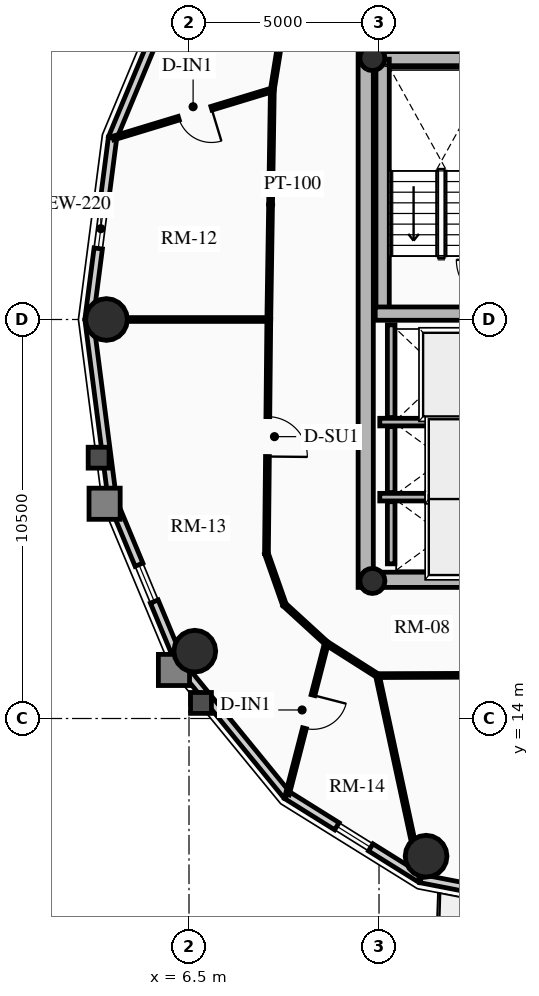
"""IFC4 building model, lengths in metres.
Left out: names, types, materials, properties, quantities, classifications, styles, units other than length and angle.
Written with IfcOpenShell. Run it as: python <this file> out.ifc"""

import sys

from ifc_helpers import new_model, si_unit, direction, frame, frame_2d, origin, origin_2d, place, context, subcontext, project, spatial, rectangle, circle, hollow_circle, extrude, source, transform, mapped, element, fill, save


model = new_model("IFC4")
c1 = context("Model", 3, precision=1e-05, world=origin(), true_north=direction((0.0, 1.0)))
c2 = subcontext(c1, "Body", "Model", "MODEL_VIEW")
j1 = project(units=[si_unit("LENGTHUNIT", "METRE"), si_unit("PLANEANGLEUNIT", "RADIAN")], contexts=[c1])
p1 = place(None, origin())
s1 = spatial("IfcSite", under=j1, at=p1, CompositionType="ELEMENT")
p2 = place(p1, origin())
s2 = spatial("IfcBuilding", under=s1, at=p2, CompositionType="ELEMENT")
p3 = place(p2, frame((0.0, 0.0, 232.45)))
s3 = spatial("IfcBuildingStorey", under=s2, at=p3, CompositionType="ELEMENT", Elevation=232.45)
p4 = place(p3, frame((11.15, 17.45, 0.0), z_axis=(0.0, 0.0, 1.0), x_axis=(0.0, 1.0, 0.0)))
e1 = element("IfcWall", 1, at=p4, inside=s3, PredefinedType="SHEAR", context=c2, shape_type="SweptSolid", body=[
    extrude(rectangle(XDim=14.1, YDim=0.4, at=frame_2d((7.05, 0.0))), origin(), (0.0, 0.0, 1.0), 3.2),
])
p5 = place(p3, frame((11.15, 17.65, 0.0), z_axis=(0.0, 0.0, 1.0), x_axis=(1.0, 0.0, 0.0)))
e2 = element("IfcWall", 2, at=p5, inside=s3, PredefinedType="SHEAR", context=c2, shape_type="SweptSolid", body=[
    extrude(rectangle(XDim=10.7, YDim=0.4, at=frame_2d((5.35, 0.0))), origin(), (0.0, 0.0, 1.0), 3.2),
])
m1 = source(origin(), c2, "Body", "SweptSolid", [
    extrude(rectangle(XDim=1.5, YDim=2.02, at=frame_2d((0.75, 1.01))), frame((0.0, 0.21, 0.0), z_axis=(0.0, -1.0, 0.0), x_axis=(1.0, 0.0, 0.0)), (0.0, 0.0, 1.0), 0.42),
])
p6 = place(p5, frame((5.45, 0.0, 0.0)))
e3 = element("IfcOpeningElement", 3, at=p6, cuts=e2, PredefinedType="OPENING", context=c2, shape_type="MappedRepresentation", body=[
    mapped(m1, transform((0.0, 0.0, 0.0), x_axis=(1.0, 0.0, 0.0), y_axis=(0.0, 1.0, 0.0), z_axis=(0.0, 0.0, 1.0), scale=1.0)),
])
p7 = place(p3, frame((11.15, 31.35, 0.0), z_axis=(0.0, 0.0, 1.0), x_axis=(1.0, 0.0, 0.0)))
e4 = element("IfcWall", 4, at=p7, inside=s3, PredefinedType="SHEAR", context=c2, shape_type="SweptSolid", body=[
    extrude(rectangle(XDim=10.7, YDim=0.4, at=frame_2d((5.35, 0.0))), origin(), (0.0, 0.0, 1.0), 3.2),
])
p8 = place(p7, frame((4.6, 0.0, 0.0)))
e5 = element("IfcOpeningElement", 5, at=p8, cuts=e4, PredefinedType="OPENING", context=c2, shape_type="MappedRepresentation", body=[
    mapped(m1, transform((0.0, 0.0, 0.0), x_axis=(1.0, 0.0, 0.0), y_axis=(0.0, 1.0, 0.0), z_axis=(0.0, 0.0, 1.0), scale=1.0)),
])
p9 = place(p3, frame((11.595, 24.655, 0.0), z_axis=(0.0, 0.0, 1.0), x_axis=(0.0, 1.0, 0.0)))
e6 = element("IfcWall", 6, at=p9, inside=s3, PredefinedType="SHEAR", context=c2, shape_type="SweptSolid", body=[
    extrude(rectangle(XDim=6.695, YDim=0.35, at=frame_2d((3.348, 0.0))), origin(), (0.0, 0.0, 1.0), 3.2),
])
p10 = place(p3, frame((11.4, 24.655, 0.0), z_axis=(0.0, 0.0, 1.0), x_axis=(1.0, 0.0, 0.0)))
e7 = element("IfcWall", 7, at=p10, inside=s3, PredefinedType="SHEAR", context=c2, shape_type="SweptSolid", body=[
    extrude(rectangle(XDim=3.285, YDim=0.35, at=frame_2d((1.643, 0.0))), origin(), (0.0, 0.0, 1.0), 3.2),
])
for number, where, z_axis, x_axis in (
    (8, (11.325, 17.62, 0.0), (0.0, 0.0, 1.0), (1.0, 0.0, 0.0)),
    (9, (11.325, 31.38, 0.0), (0.0, 0.0, 1.0), (1.0, 0.0, 0.0)),
):
    element("IfcColumn", number, at=place(p3, frame(where, z_axis=z_axis, x_axis=x_axis)), inside=s3, PredefinedType="COLUMN", context=c2, shape_type="SweptSolid", body=[
        extrude(hollow_circle(Radius=0.33, WallThickness=0.025, at=origin_2d()), origin(), (0.0, 0.0, 1.0), 3.2),
    ])
for number, where, z_axis, x_axis in (
    (10, (4.328, 24.5, 0.0), (0.0, 0.0, 1.0), (1.0, 0.0, 0.0)),
    (11, (6.653, 15.771, 0.0), (0.0, 0.0, 1.0), (1.0, 0.0, 0.0)),
    (12, (12.739, 10.377, 0.0), (0.0, 0.0, 1.0), (1.0, 0.0, 0.0)),
):
    element("IfcColumn", number, at=place(p3, frame(where, z_axis=z_axis, x_axis=x_axis)), inside=s3, PredefinedType="USERDEFINED", context=c2, shape_type="SweptSolid", body=[
        extrude(circle(Radius=0.55, at=origin_2d()), origin(), (0.0, 0.0, 1.0), 3.2),
    ])
p11 = place(p3, frame((4.488, 29.281, 0.0), z_axis=(0.0, 0.0, 1.0), x_axis=(0.384036305194, 0.923317993052, 0.0)))
e13 = element("IfcWall", 13, at=p11, inside=s3, PredefinedType="SOLIDWALL", context=c2, shape_type="SweptSolid", body=[
    extrude(rectangle(XDim=4.671, YDim=0.22, at=frame_2d((2.335, 0.0))), origin(), (0.0, 0.0, 1.0), 2.402),
])
p12 = place(p3, frame((3.87, 24.5, 0.0), z_axis=(0.0, 0.0, 1.0), x_axis=(0.128241318541, 0.991742993027, 0.0)))
e14 = element("IfcWall", 14, at=p12, inside=s3, PredefinedType="SOLIDWALL", context=c2, shape_type="SweptSolid", body=[
    extrude(rectangle(XDim=4.82, YDim=0.22, at=frame_2d((2.41, 0.0))), origin(), (0.0, 0.0, 1.0), 2.402),
])
m2 = source(origin(), c2, "Body", "SweptSolid", [
    extrude(rectangle(XDim=1.05, YDim=1.3, at=frame_2d((0.525, 0.65))), frame((0.0, 0.12, 0.0), z_axis=(0.0, -1.0, 0.0), x_axis=(1.0, 0.0, 0.0)), (0.0, 0.0, 1.0), 0.24),
])
p13 = place(p12, frame((1.885, 0.0, 0.65)))
e15 = element("IfcOpeningElement", 15, at=p13, cuts=e14, PredefinedType="OPENING", context=c2, shape_type="MappedRepresentation", body=[
    mapped(m2, transform((0.0, 0.0, 0.0), x_axis=(1.0, 0.0, 0.0), y_axis=(0.0, 1.0, 0.0), z_axis=(0.0, 0.0, 1.0), scale=1.0)),
])
p14 = place(p3, frame((4.488, 19.719, 0.0), z_axis=(0.0, 0.0, 1.0), x_axis=(-0.128241318541, 0.991742993027, 0.0)))
e16 = element("IfcWall", 16, at=p14, inside=s3, PredefinedType="SOLIDWALL", context=c2, shape_type="SweptSolid", body=[
    extrude(rectangle(XDim=4.82, YDim=0.22, at=frame_2d((2.41, 0.0))), origin(), (0.0, 0.0, 1.0), 2.402),
])
p15 = place(p3, frame((6.282, 15.407, 0.0), z_axis=(0.0, 0.0, 1.0), x_axis=(-0.384036305194, 0.923317993052, 0.0)))
e17 = element("IfcWall", 17, at=p15, inside=s3, PredefinedType="SOLIDWALL", context=c2, shape_type="SweptSolid", body=[
    extrude(rectangle(XDim=4.671, YDim=0.22, at=frame_2d((2.335, 0.0))), origin(), (0.0, 0.0, 1.0), 2.402),
])
p16 = place(p15, frame((1.81, 0.0, 0.65)))
e18 = element("IfcOpeningElement", 18, at=p16, cuts=e17, PredefinedType="OPENING", context=c2, shape_type="MappedRepresentation", body=[
    mapped(m2, transform((0.0, 0.0, 0.0), x_axis=(1.0, 0.0, 0.0), y_axis=(0.0, 1.0, 0.0), z_axis=(0.0, 0.0, 1.0), scale=1.0)),
])
p17 = place(p3, frame((9.076, 11.985, 0.0), z_axis=(0.0, 0.0, 1.0), x_axis=(-0.632467166636, 0.774587169483, 0.0)))
e19 = element("IfcWall", 19, at=p17, inside=s3, PredefinedType="SOLIDWALL", context=c2, shape_type="SweptSolid", body=[
    extrude(rectangle(XDim=4.418, YDim=0.22, at=frame_2d((2.209, 0.0))), origin(), (0.0, 0.0, 1.0), 2.402),
])
p18 = place(p3, frame((12.597, 9.787, 0.0), z_axis=(0.0, 0.0, 1.0), x_axis=(-0.848318713376, 0.529485939886, 0.0)))
e20 = element("IfcWall", 20, at=p18, inside=s3, PredefinedType="SOLIDWALL", context=c2, shape_type="SweptSolid", body=[
    extrude(rectangle(XDim=4.15, YDim=0.22, at=frame_2d((2.075, 0.0))), origin(), (0.0, 0.0, 1.0), 2.402),
])
p19 = place(p18, frame((1.55, 0.0, 0.65)))
e21 = element("IfcOpeningElement", 21, at=p19, cuts=e20, PredefinedType="OPENING", context=c2, shape_type="MappedRepresentation", body=[
    mapped(m2, transform((0.0, 0.0, 0.0), x_axis=(1.0, 0.0, 0.0), y_axis=(0.0, 1.0, 0.0), z_axis=(0.0, 0.0, 1.0), scale=1.0)),
])
p20 = place(p3, frame((16.5, 9.03, 0.0), z_axis=(0.0, 0.0, 1.0), x_axis=(-0.981700307484, 0.190432419211, 0.0)))
e22 = element("IfcWall", 22, at=p20, inside=s3, PredefinedType="SOLIDWALL", context=c2, shape_type="SweptSolid", body=[
    extrude(rectangle(XDim=3.976, YDim=0.22, at=frame_2d((1.988, 0.0))), origin(), (0.0, 0.0, 1.0), 2.402),
])
m3 = source(origin(), c2, "Body", "SweptSolid", [
    extrude(rectangle(XDim=1.15, YDim=2.005, at=frame_2d((0.575, 1.002))), frame((0.0, 0.12, 0.0), z_axis=(0.0, -1.0, 0.0), x_axis=(1.0, 0.0, 0.0)), (0.0, 0.0, 1.0), 0.24),
])
p21 = place(p20, frame((1.413, 0.0, 0.0)))
e23 = element("IfcOpeningElement", 23, at=p21, cuts=e22, PredefinedType="OPENING", context=c2, shape_type="MappedRepresentation", body=[
    mapped(m3, transform((0.0, 0.0, 0.0), x_axis=(1.0, 0.0, 0.0), y_axis=(0.0, 1.0, 0.0), z_axis=(0.0, 0.0, 1.0), scale=1.0)),
])
p22 = place(p3, frame((11.52, 21.8, 0.0), z_axis=(0.0, 0.0, 1.0), x_axis=(1.0, 0.0, 0.0)))
e24 = element("IfcWall", 24, at=p22, inside=s3, PredefinedType="SHEAR", context=c2, shape_type="SweptSolid", body=[
    extrude(rectangle(XDim=2.97, YDim=0.2, at=frame_2d((1.485, 0.0))), origin(), (0.0, 0.0, 1.0), 3.2),
])
p23 = place(p3, frame((11.82, 21.92, 0.0), z_axis=(0.0, 0.0, 1.0), x_axis=(0.0, 1.0, 0.0)))
e25 = element("IfcWall", 25, at=p23, inside=s3, PredefinedType="SHEAR", context=c2, shape_type="SweptSolid", body=[
    extrude(rectangle(XDim=2.44, YDim=0.2, at=frame_2d((1.22, 0.0))), origin(), (0.0, 0.0, 1.0), 3.2),
])
p24 = place(p3, frame((11.52, 19.825, 0.0), z_axis=(0.0, 0.0, 1.0), x_axis=(1.0, 0.0, 0.0)))
e26 = element("IfcWall", 26, at=p24, inside=s3, PredefinedType="SHEAR", context=c2, shape_type="SweptSolid", body=[
    extrude(rectangle(XDim=2.97, YDim=0.2, at=frame_2d((1.485, 0.0))), origin(), (0.0, 0.0, 1.0), 3.2),
])
p25 = place(p3, frame((11.82, 19.945, 0.0), z_axis=(0.0, 0.0, 1.0), x_axis=(0.0, 1.0, 0.0)))
e27 = element("IfcWall", 27, at=p25, inside=s3, PredefinedType="SHEAR", context=c2, shape_type="SweptSolid", body=[
    extrude(rectangle(XDim=1.735, YDim=0.2, at=frame_2d((0.867, 0.0))), origin(), (0.0, 0.0, 1.0), 3.2),
])
p26 = place(p3, frame((11.82, 18.07, 0.0), z_axis=(0.0, 0.0, 1.0), x_axis=(0.0, 1.0, 0.0)))
e28 = element("IfcWall", 28, at=p26, inside=s3, PredefinedType="SHEAR", context=c2, shape_type="SweptSolid", body=[
    extrude(rectangle(XDim=1.635, YDim=0.2, at=frame_2d((0.817, 0.0))), origin(), (0.0, 0.0, 1.0), 3.2),
])
p27 = place(p3, frame((8.94, 32.078, 0.0), z_axis=(0.0, 0.0, 1.0), x_axis=(-0.159148467753, -0.98725466077, 0.0)))
e29 = element("IfcWall", 29, at=p27, inside=s3, PredefinedType="MOVABLE", context=c2, shape_type="SweptSolid", body=[
    extrude(rectangle(XDim=1.554, YDim=0.1, at=frame_2d((0.777, 0.0))), origin(), (0.0, 0.0, 1.0), 2.335),
])
p28 = place(p3, frame((8.693, 30.544, 0.0), z_axis=(0.0, 0.0, 1.0), x_axis=(-0.015307007986, -0.99988284089, 0.0)))
e30 = element("IfcWall", 30, at=p28, inside=s3, PredefinedType="MOVABLE", context=c2, shape_type="SweptSolid", body=[
    extrude(rectangle(XDim=6.045, YDim=0.1, at=frame_2d((3.022, 0.0))), origin(), (0.0, 0.0, 1.0), 2.335),
])
p29 = place(p3, frame((8.6, 24.5, 0.0), z_axis=(0.0, 0.0, 1.0), x_axis=(-0.010023665349, -0.999949761805, 0.0)))
e31 = element("IfcWall", 31, at=p29, inside=s3, PredefinedType="MOVABLE", context=c2, shape_type="SweptSolid", body=[
    extrude(rectangle(XDim=6.162, YDim=0.1, at=frame_2d((3.081, 0.0))), origin(), (0.0, 0.0, 1.0), 2.335),
])
m4 = source(origin(), c2, "Body", "SweptSolid", [
    extrude(rectangle(XDim=1.05, YDim=2.015, at=frame_2d((0.525, 1.007))), frame((0.0, 0.06, 0.0), z_axis=(0.0, -1.0, 0.0), x_axis=(1.0, 0.0, 0.0)), (0.0, 0.0, 1.0), 0.12),
])
p30 = place(p29, frame((2.556, 0.0, 0.0)))
e32 = element("IfcOpeningElement", 32, at=p30, cuts=e31, PredefinedType="OPENING", context=c2, shape_type="MappedRepresentation", body=[
    mapped(m4, transform((0.0, 0.0, 0.0), x_axis=(1.0, 0.0, 0.0), y_axis=(0.0, 1.0, 0.0), z_axis=(0.0, 0.0, 1.0), scale=1.0)),
])
p31 = place(p3, frame((8.538, 18.338, 0.0), z_axis=(0.0, 0.0, 1.0), x_axis=(0.331358150167, -0.94350504838, 0.0)))
e33 = element("IfcWall", 33, at=p31, inside=s3, PredefinedType="MOVABLE", context=c2, shape_type="SweptSolid", body=[
    extrude(rectangle(XDim=1.424, YDim=0.1, at=frame_2d((0.712, 0.0))), origin(), (0.0, 0.0, 1.0), 2.335),
])
p32 = place(p3, frame((9.01, 16.994, 0.0), z_axis=(0.0, 0.0, 1.0), x_axis=(0.737701798986, -0.67512669609, 0.0)))
e34 = element("IfcWall", 34, at=p32, inside=s3, PredefinedType="MOVABLE", context=c2, shape_type="SweptSolid", body=[
    extrude(rectangle(XDim=1.498, YDim=0.1, at=frame_2d((0.749, 0.0))), origin(), (0.0, 0.0, 1.0), 2.402),
])
p33 = place(p3, frame((10.115, 15.983, 0.0), z_axis=(0.0, 0.0, 1.0), x_axis=(0.843995849351, -0.536349705209, 0.0)))
e35 = element("IfcWall", 35, at=p33, inside=s3, PredefinedType="MOVABLE", context=c2, shape_type="SweptSolid", body=[
    extrude(rectangle(XDim=1.593, YDim=0.1, at=frame_2d((0.796, 0.0))), origin(), (0.0, 0.0, 1.0), 2.335),
])
p34 = place(p3, frame((11.46, 15.129, 0.0), z_axis=(0.0, 0.0, 1.0), x_axis=(0.999993513287, 0.003601858435, 0.0)))
e36 = element("IfcWall", 36, at=p34, inside=s3, PredefinedType="MOVABLE", context=c2, shape_type="SweptSolid", body=[
    extrude(rectangle(XDim=3.321, YDim=0.1, at=frame_2d((1.661, 0.0))), origin(), (0.0, 0.0, 1.0), 2.402),
])
p35 = place(p3, frame((8.6, 24.5, 0.0), z_axis=(0.0, 0.0, 1.0), x_axis=(-1.0, 0.0, 0.0)))
e37 = element("IfcWall", 37, at=p35, inside=s3, PredefinedType="MOVABLE", context=c2, shape_type="SweptSolid", body=[
    extrude(rectangle(XDim=4.71, YDim=0.1, at=frame_2d((2.355, 0.0))), origin(), (0.0, 0.0, 1.0), 2.402),
])
p36 = place(p3, frame((11.46, 15.129, 0.0), z_axis=(0.0, 0.0, 1.0), x_axis=(0.210058897642, -0.977688733453, 0.0)))
e38 = element("IfcWall", 38, at=p36, inside=s3, PredefinedType="MOVABLE", context=c2, shape_type="SweptSolid", body=[
    extrude(rectangle(XDim=5.444, YDim=0.1, at=frame_2d((2.722, 0.0))), origin(), (0.0, 0.0, 1.0), 2.402),
])
p37 = place(p3, frame((8.693, 30.544, 0.0), z_axis=(0.0, 0.0, 1.0), x_axis=(-0.956933754187, -0.290306372814, 0.0)))
e39 = element("IfcWall", 39, at=p37, inside=s3, PredefinedType="MOVABLE", context=c2, shape_type="SweptSolid", body=[
    extrude(rectangle(XDim=4.374, YDim=0.1, at=frame_2d((2.187, 0.0))), origin(), (0.0, 0.0, 1.0), 2.335),
])
m5 = source(origin(), c2, "Body", "SweptSolid", [
    extrude(rectangle(XDim=0.9, YDim=2.005, at=frame_2d((0.45, 1.002))), frame((0.0, 0.06, 0.0), z_axis=(0.0, -1.0, 0.0), x_axis=(1.0, 0.0, 0.0)), (0.0, 0.0, 1.0), 0.12),
])
p38 = place(p37, frame((1.674, 0.0, 0.0)))
e40 = element("IfcOpeningElement", 40, at=p38, cuts=e39, PredefinedType="OPENING", context=c2, shape_type="MappedRepresentation", body=[
    mapped(m5, transform((0.0, 0.0, 0.0), x_axis=(1.0, 0.0, 0.0), y_axis=(0.0, 1.0, 0.0), z_axis=(0.0, 0.0, 1.0), scale=1.0)),
])
p39 = place(p3, frame((10.115, 15.983, 0.0), z_axis=(0.0, 0.0, 1.0), x_axis=(-0.249861860474, -0.968281493513, 0.0)))
e41 = element("IfcWall", 41, at=p39, inside=s3, PredefinedType="MOVABLE", context=c2, shape_type="SweptSolid", body=[
    extrude(rectangle(XDim=4.113, YDim=0.1, at=frame_2d((2.056, 0.0))), origin(), (0.0, 0.0, 1.0), 2.335),
])
p40 = place(p39, frame((1.413, 0.0, 0.0)))
e42 = element("IfcOpeningElement", 42, at=p40, cuts=e41, PredefinedType="OPENING", context=c2, shape_type="MappedRepresentation", body=[
    mapped(m5, transform((0.0, 0.0, 0.0), x_axis=(1.0, 0.0, 0.0), y_axis=(0.0, 1.0, 0.0), z_axis=(0.0, 0.0, 1.0), scale=1.0)),
])
m6 = source(origin(), c2, "Body", "SweptSolid", [
    extrude(rectangle(XDim=1.05, YDim=1.3, at=frame_2d((0.525, 0.65))), frame((0.0, 0.03, 0.0), z_axis=(0.0, -1.0, 0.0), x_axis=(1.0, 0.0, 0.0)), (0.0, 0.0, 1.0), 0.06),
])
p41 = place(p13, origin())
e43 = element("IfcWindow", 43, at=p41, inside=s3, PartitioningType="SINGLE_PANEL", PredefinedType="WINDOW", context=c2, shape_type="MappedRepresentation", body=[
    mapped(m6, transform((0.0, 0.0, 0.0), x_axis=(1.0, 0.0, 0.0), y_axis=(0.0, 1.0, 0.0), z_axis=(0.0, 0.0, 1.0), scale=1.0)),
])
fill(e15, e43)
p42 = place(p16, origin())
e44 = element("IfcWindow", 44, at=p42, inside=s3, PartitioningType="SINGLE_PANEL", PredefinedType="WINDOW", context=c2, shape_type="MappedRepresentation", body=[
    mapped(m6, transform((0.0, 0.0, 0.0), x_axis=(1.0, 0.0, 0.0), y_axis=(0.0, 1.0, 0.0), z_axis=(0.0, 0.0, 1.0), scale=1.0)),
])
fill(e18, e44)
p43 = place(p19, origin())
e45 = element("IfcWindow", 45, at=p43, inside=s3, PartitioningType="SINGLE_PANEL", PredefinedType="WINDOW", context=c2, shape_type="MappedRepresentation", body=[
    mapped(m6, transform((0.0, 0.0, 0.0), x_axis=(1.0, 0.0, 0.0), y_axis=(0.0, 1.0, 0.0), z_axis=(0.0, 0.0, 1.0), scale=1.0)),
])
fill(e21, e45)
m7 = source(origin(), c2, "Body", "SweptSolid", [
    extrude(rectangle(XDim=0.9, YDim=2.005, at=frame_2d((0.45, 1.002))), frame((0.0, 0.025, 0.0), z_axis=(0.0, -1.0, 0.0), x_axis=(1.0, 0.0, 0.0)), (0.0, 0.0, 1.0), 0.05),
])
p44 = place(p38, origin())
e46 = element("IfcDoor", 46, at=p44, inside=s3, OperationType="SINGLE_SWING_LEFT", PredefinedType="DOOR", context=c2, shape_type="MappedRepresentation", body=[
    mapped(m7, transform((0.0, 0.0, 0.0), x_axis=(1.0, 0.0, 0.0), y_axis=(0.0, 1.0, 0.0), z_axis=(0.0, 0.0, 1.0), scale=1.0)),
])
fill(e40, e46)
m8 = source(origin(), c2, "Body", "SweptSolid", [
    extrude(rectangle(XDim=1.05, YDim=2.015, at=frame_2d((0.525, 1.007))), frame((0.0, 0.025, 0.0), z_axis=(0.0, -1.0, 0.0), x_axis=(1.0, 0.0, 0.0)), (0.0, 0.0, 1.0), 0.05),
])
p45 = place(p30, origin())
e47 = element("IfcDoor", 47, at=p45, inside=s3, OperationType="SINGLE_SWING_RIGHT", PredefinedType="DOOR", context=c2, shape_type="MappedRepresentation", body=[
    mapped(m8, transform((0.0, 0.0, 0.0), x_axis=(1.0, 0.0, 0.0), y_axis=(0.0, 1.0, 0.0), z_axis=(0.0, 0.0, 1.0), scale=1.0)),
])
fill(e32, e47)
p46 = place(p40, origin())
e48 = element("IfcDoor", 48, at=p46, inside=s3, OperationType="SINGLE_SWING_LEFT", PredefinedType="DOOR", context=c2, shape_type="MappedRepresentation", body=[
    mapped(m7, transform((0.0, 0.0, 0.0), x_axis=(1.0, 0.0, 0.0), y_axis=(0.0, 1.0, 0.0), z_axis=(0.0, 0.0, 1.0), scale=1.0)),
])
fill(e42, e48)
save(model, sys.argv[1])
